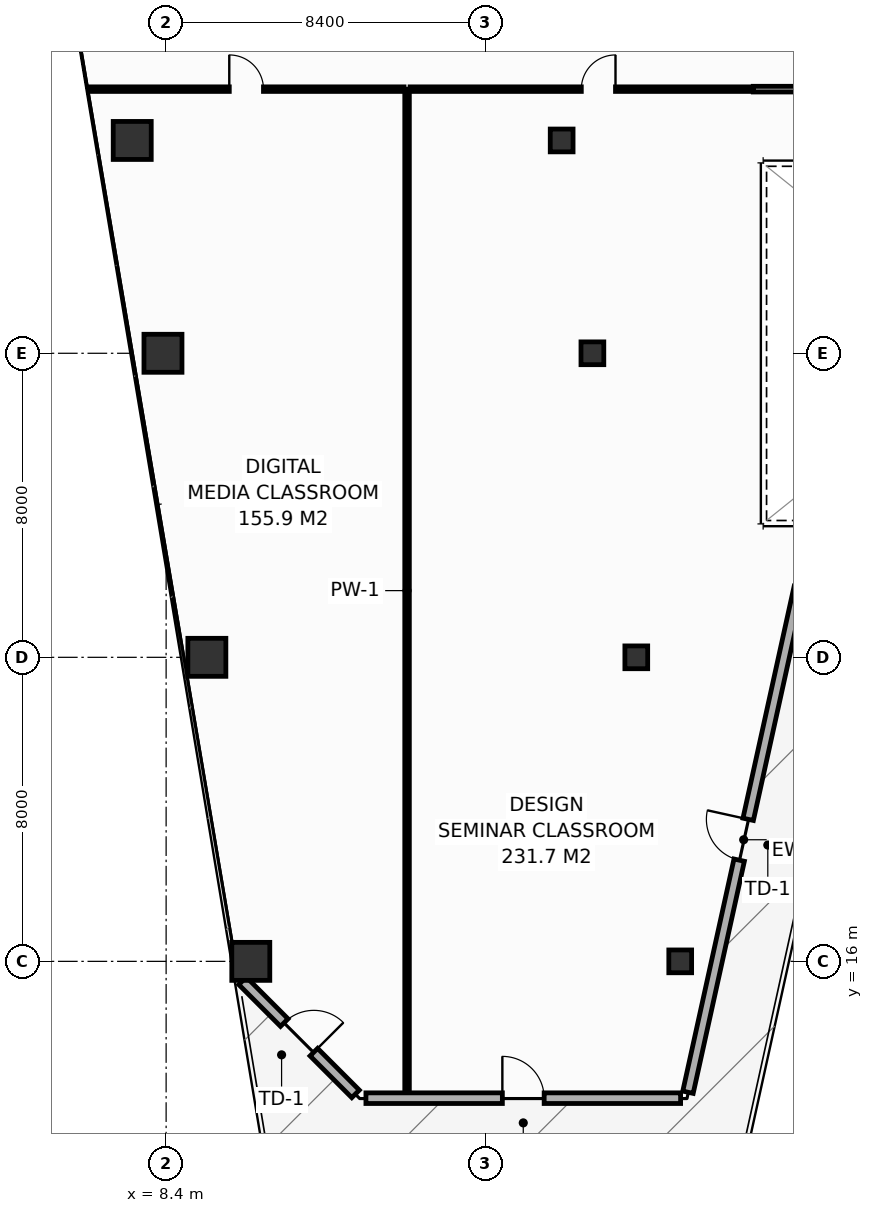
"""IFC4 building model, lengths in metres.
Left out: names, types, materials, properties, quantities, classifications, styles, units other than length and angle.
Written with IfcOpenShell. Run it as: python <this file> out.ifc"""

import sys

from ifc_helpers import new_model, si_unit, direction, frame, frame_2d, origin, origin_2d, place, context, subcontext, project, spatial, rectangle, hollow_rectangle, extrude, element, fill, save


model = new_model("IFC4")
c1 = context("Model", 3, precision=1e-05, world=origin(), true_north=direction((0.0, 1.0)))
c2 = subcontext(c1, "Body", "Model", "MODEL_VIEW")
j1 = project(units=[si_unit("LENGTHUNIT", "METRE"), si_unit("PLANEANGLEUNIT", "RADIAN")], contexts=[c1])
p1 = place(None, origin())
s1 = spatial("IfcSite", under=j1, at=p1, CompositionType="ELEMENT")
p2 = place(p1, origin())
s2 = spatial("IfcBuilding", under=s1, at=p2, CompositionType="ELEMENT")
p3 = place(p2, frame((0.0, 0.0, 167.6)))
s3 = spatial("IfcBuildingStorey", under=s2, at=p3, CompositionType="ELEMENT", Elevation=167.6)
p4 = place(p3, frame((10.628, 16.0, 0.0), z_axis=(0.0, 0.0, 1.0), x_axis=(1.0, 0.0, 0.0)))
e1 = element("IfcColumn", 1, at=p4, inside=s3, PredefinedType="COLUMN", context=c2, shape_type="SweptSolid", body=[
    extrude(hollow_rectangle(XDim=1.0, YDim=1.0, WallThickness=0.045, at=origin_2d()), origin(), (0.0, 0.0, 1.0), 3.8),
])
p5 = place(p3, frame((21.928, 16.0, 0.0), z_axis=(0.0, 0.0, 1.0), x_axis=(1.0, 0.0, 0.0)))
e2 = element("IfcColumn", 2, at=p5, inside=s3, PredefinedType="COLUMN", context=c2, shape_type="SweptSolid", body=[
    extrude(hollow_rectangle(XDim=0.6, YDim=0.6, WallThickness=0.028, at=origin_2d()), origin(), (0.0, 0.0, 1.0), 3.8),
])
p6 = place(p3, frame((9.472, 24.0, 0.0), z_axis=(0.0, 0.0, 1.0), x_axis=(1.0, 0.0, 0.0)))
e3 = element("IfcColumn", 3, at=p6, inside=s3, PredefinedType="COLUMN", context=c2, shape_type="SweptSolid", body=[
    extrude(hollow_rectangle(XDim=1.0, YDim=1.0, WallThickness=0.045, at=origin_2d()), origin(), (0.0, 0.0, 1.0), 3.8),
])
p7 = place(p3, frame((20.772, 24.0, 0.0), z_axis=(0.0, 0.0, 1.0), x_axis=(1.0, 0.0, 0.0)))
e4 = element("IfcColumn", 4, at=p7, inside=s3, PredefinedType="COLUMN", context=c2, shape_type="SweptSolid", body=[
    extrude(hollow_rectangle(XDim=0.6, YDim=0.6, WallThickness=0.028, at=origin_2d()), origin(), (0.0, 0.0, 1.0), 3.8),
])
p8 = place(p3, frame((8.317, 32.0, 0.0), z_axis=(0.0, 0.0, 1.0), x_axis=(1.0, 0.0, 0.0)))
e5 = element("IfcColumn", 5, at=p8, inside=s3, PredefinedType="COLUMN", context=c2, shape_type="SweptSolid", body=[
    extrude(hollow_rectangle(XDim=1.0, YDim=1.0, WallThickness=0.045, at=origin_2d()), origin(), (0.0, 0.0, 1.0), 3.8),
])
p9 = place(p3, frame((19.617, 32.0, 0.0), z_axis=(0.0, 0.0, 1.0), x_axis=(1.0, 0.0, 0.0)))
e6 = element("IfcColumn", 6, at=p9, inside=s3, PredefinedType="COLUMN", context=c2, shape_type="SweptSolid", body=[
    extrude(hollow_rectangle(XDim=0.6, YDim=0.6, WallThickness=0.028, at=origin_2d()), origin(), (0.0, 0.0, 1.0), 3.8),
])
p10 = place(p3, frame((7.508, 37.6, 0.0), z_axis=(0.0, 0.0, 1.0), x_axis=(1.0, 0.0, 0.0)))
e7 = element("IfcColumn", 7, at=p10, inside=s3, PredefinedType="COLUMN", context=c2, shape_type="SweptSolid", body=[
    extrude(hollow_rectangle(XDim=1.0, YDim=1.0, WallThickness=0.045, at=origin_2d()), origin(), (0.0, 0.0, 1.0), 3.8),
])
p11 = place(p3, frame((18.808, 37.6, 0.0), z_axis=(0.0, 0.0, 1.0), x_axis=(1.0, 0.0, 0.0)))
e8 = element("IfcColumn", 8, at=p11, inside=s3, PredefinedType="COLUMN", context=c2, shape_type="SweptSolid", body=[
    extrude(hollow_rectangle(XDim=0.6, YDim=0.6, WallThickness=0.028, at=origin_2d()), origin(), (0.0, 0.0, 1.0), 3.8),
])
p12 = place(p3, frame((10.411, 15.487, 0.0), z_axis=(0.0, 0.0, 1.0), x_axis=(0.707135806771, -0.70707775441, 0.0)))
e9 = element("IfcWall", 9, at=p12, inside=s3, PredefinedType="STANDARD", context=c2, shape_type="SweptSolid", body=[
    extrude(rectangle(XDim=4.206, YDim=0.28, at=frame_2d((2.103, 0.0))), origin(), (0.0, 0.0, 1.0), 3.55),
])
p13 = place(p12, frame((1.553, 0.0, 0.0)))
e10 = element("IfcOpeningElement", 10, at=p13, cuts=e9, PredefinedType="OPENING", context=c2, shape_type="SweptSolid", body=[
    extrude(rectangle(XDim=1.1, YDim=2.2, at=frame_2d((0.55, 1.1))), frame((0.0, 0.15, 0.0), z_axis=(0.0, -1.0, 0.0), x_axis=(1.0, 0.0, 0.0)), (0.0, 0.0, 1.0), 0.3),
])
p14 = place(p3, frame((13.658, 12.4, 0.0), z_axis=(0.0, 0.0, 1.0), x_axis=(1.0, 0.0, 0.0)))
e11 = element("IfcWall", 11, at=p14, inside=s3, PredefinedType="STANDARD", context=c2, shape_type="SweptSolid", body=[
    extrude(rectangle(XDim=8.28, YDim=0.28, at=frame_2d((4.14, 0.0))), origin(), (0.0, 0.0, 1.0), 3.55),
])
p15 = place(p14, frame((3.59, 0.0, 0.0)))
e12 = element("IfcOpeningElement", 12, at=p15, cuts=e11, PredefinedType="OPENING", context=c2, shape_type="SweptSolid", body=[
    extrude(rectangle(XDim=1.1, YDim=2.2, at=frame_2d((0.55, 1.1))), frame((0.0, 0.15, 0.0), z_axis=(0.0, -1.0, 0.0), x_axis=(1.0, 0.0, 0.0)), (0.0, 0.0, 1.0), 0.3),
])
p16 = place(p3, frame((22.132, 12.556, 0.0), z_axis=(0.0, 0.0, 1.0), x_axis=(0.215397075206, 0.976526548535, 0.0)))
e13 = element("IfcWall", 13, at=p16, inside=s3, PredefinedType="STANDARD", context=c2, shape_type="SweptSolid", body=[
    extrude(rectangle(XDim=13.607, YDim=0.28, at=frame_2d((6.803, 0.0))), origin(), (0.0, 0.0, 1.0), 3.55),
])
p17 = place(p16, frame((6.254, 0.0, 0.0)))
e14 = element("IfcOpeningElement", 14, at=p17, cuts=e13, PredefinedType="OPENING", context=c2, shape_type="SweptSolid", body=[
    extrude(rectangle(XDim=1.1, YDim=2.2, at=frame_2d((0.55, 1.1))), frame((0.0, 0.15, 0.0), z_axis=(0.0, -1.0, 0.0), x_axis=(1.0, 0.0, 0.0)), (0.0, 0.0, 1.0), 0.3),
])
p18 = place(p3, frame((14.74, 12.56, 0.0), z_axis=(0.0, 0.0, 1.0), x_axis=(0.0, 1.0, 0.0)))
e15 = element("IfcWall", 15, at=p18, inside=s3, PredefinedType="PARTITIONING", context=c2, shape_type="SweptSolid", body=[
    extrude(rectangle(XDim=26.39, YDim=0.12, at=frame_2d((13.195, 0.0))), origin(), (0.0, 0.0, 1.0), 2.835),
])
p19 = place(p3, frame((6.363, 38.95, 0.0), z_axis=(0.0, 0.0, 1.0), x_axis=(1.0, 0.0, 0.0)))
e16 = element("IfcWall", 16, at=p19, inside=s3, PredefinedType="PARTITIONING", context=c2, shape_type="SweptSolid", body=[
    extrude(rectangle(XDim=8.297, YDim=0.12, at=frame_2d((4.148, 0.0))), origin(), (0.0, 0.0, 1.0), 3.035),
])
p20 = place(p19, frame((3.699, 0.0, 0.0)))
e17 = element("IfcOpeningElement", 17, at=p20, cuts=e16, PredefinedType="OPENING", context=c2, shape_type="SweptSolid", body=[
    extrude(rectangle(XDim=0.9, YDim=2.1, at=frame_2d((0.45, 1.05))), frame((0.0, 0.07, 0.0), z_axis=(0.0, -1.0, 0.0), x_axis=(1.0, 0.0, 0.0)), (0.0, 0.0, 1.0), 0.14),
])
p21 = place(p3, frame((14.82, 38.95, 0.0), z_axis=(0.0, 0.0, 1.0), x_axis=(1.0, 0.0, 0.0)))
e18 = element("IfcWall", 18, at=p21, inside=s3, PredefinedType="PARTITIONING", context=c2, shape_type="SweptSolid", body=[
    extrude(rectangle(XDim=9.03, YDim=0.12, at=frame_2d((4.515, 0.0))), origin(), (0.0, 0.0, 1.0), 2.835),
])
p22 = place(p21, frame((4.505, 0.0, 0.0)))
e19 = element("IfcOpeningElement", 19, at=p22, cuts=e18, PredefinedType="OPENING", context=c2, shape_type="SweptSolid", body=[
    extrude(rectangle(XDim=0.9, YDim=2.1, at=frame_2d((0.45, 1.05))), frame((0.0, 0.07, 0.0), z_axis=(0.0, -1.0, 0.0), x_axis=(1.0, 0.0, 0.0)), (0.0, 0.0, 1.0), 0.14),
])
p23 = place(p3, frame((23.85, 38.95, 0.0), z_axis=(0.0, 0.0, 1.0), x_axis=(1.0, 0.0, 0.0)))
e20 = element("IfcWall", 20, at=p23, inside=s3, PredefinedType="PARTITIONING", context=c2, shape_type="SweptSolid", body=[
    extrude(rectangle(XDim=12.3, YDim=0.15, at=frame_2d((6.15, 0.0))), origin(), (0.0, 0.0, 1.0), 3.55),
])
p24 = place(p13, origin())
e21 = element("IfcDoor", 21, at=p24, inside=s3, OperationType="SINGLE_SWING_RIGHT", PredefinedType="DOOR", context=c2, shape_type="SweptSolid", body=[
    extrude(rectangle(XDim=1.1, YDim=2.2, at=frame_2d((0.55, 1.1))), frame((0.0, 0.025, 0.0), z_axis=(0.0, -1.0, 0.0), x_axis=(1.0, 0.0, 0.0)), (0.0, 0.0, 1.0), 0.05),
])
fill(e10, e21)
p25 = place(p15, origin())
e22 = element("IfcDoor", 22, at=p25, inside=s3, OperationType="SINGLE_SWING_LEFT", PredefinedType="DOOR", context=c2, shape_type="SweptSolid", body=[
    extrude(rectangle(XDim=1.1, YDim=2.2, at=frame_2d((0.55, 1.1))), frame((0.0, 0.025, 0.0), z_axis=(0.0, -1.0, 0.0), x_axis=(1.0, 0.0, 0.0)), (0.0, 0.0, 1.0), 0.05),
])
fill(e12, e22)
p26 = place(p17, origin())
e23 = element("IfcDoor", 23, at=p26, inside=s3, OperationType="SINGLE_SWING_RIGHT", PredefinedType="DOOR", context=c2, shape_type="SweptSolid", body=[
    extrude(rectangle(XDim=1.1, YDim=2.2, at=frame_2d((0.55, 1.1))), frame((0.0, 0.025, 0.0), z_axis=(0.0, -1.0, 0.0), x_axis=(1.0, 0.0, 0.0)), (0.0, 0.0, 1.0), 0.05),
])
fill(e14, e23)
p27 = place(p20, origin())
e24 = element("IfcDoor", 24, at=p27, inside=s3, OperationType="SINGLE_SWING_LEFT", PredefinedType="DOOR", context=c2, shape_type="SweptSolid", body=[
    extrude(rectangle(XDim=0.9, YDim=2.1, at=frame_2d((0.45, 1.05))), frame((0.0, 0.025, 0.0), z_axis=(0.0, -1.0, 0.0), x_axis=(1.0, 0.0, 0.0)), (0.0, 0.0, 1.0), 0.05),
])
fill(e17, e24)
p28 = place(p22, origin())
e25 = element("IfcDoor", 25, at=p28, inside=s3, OperationType="SINGLE_SWING_RIGHT", PredefinedType="DOOR", context=c2, shape_type="SweptSolid", body=[
    extrude(rectangle(XDim=0.9, YDim=2.1, at=frame_2d((0.45, 1.05))), frame((0.0, 0.025, 0.0), z_axis=(0.0, -1.0, 0.0), x_axis=(1.0, 0.0, 0.0)), (0.0, 0.0, 1.0), 0.05),
])
fill(e19, e25)
save(model, sys.argv[1])
